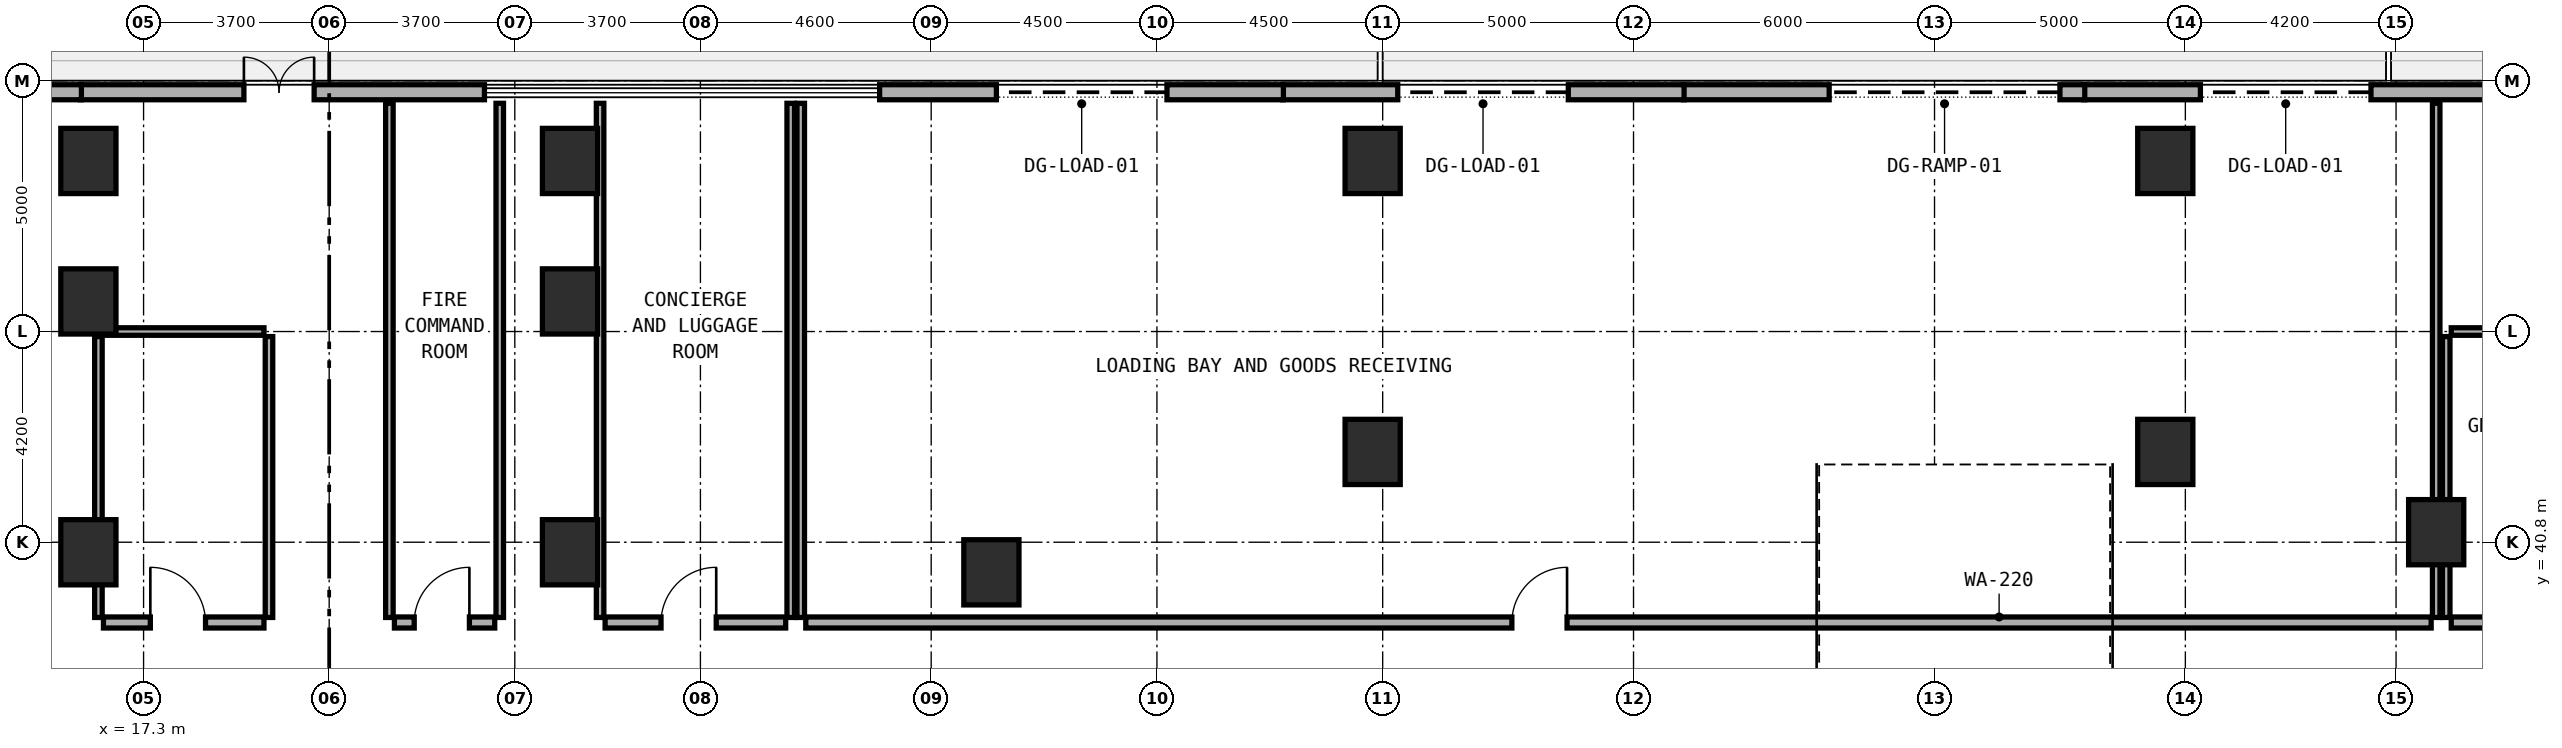
"""IFC4 building model, lengths in metres.
Left out: names, types, materials, properties, quantities, classifications, styles, units other than length and angle.
Written with IfcOpenShell. Run it as: python <this file> out.ifc"""

import sys

from ifc_helpers import new_model, si_unit, direction, frame, frame_2d, origin, origin_2d, place, context, subcontext, project, spatial, rectangle, extrude, element, fill, save


model = new_model("IFC4")
c1 = context("Model", 3, precision=1e-05, world=origin(), true_north=direction((0.0, 1.0)))
c2 = subcontext(c1, "Body", "Model", "MODEL_VIEW")
j1 = project(units=[si_unit("LENGTHUNIT", "METRE"), si_unit("PLANEANGLEUNIT", "RADIAN")], contexts=[c1])
p1 = place(None, origin())
s1 = spatial("IfcSite", under=j1, at=p1, CompositionType="ELEMENT")
p2 = place(p1, origin())
s2 = spatial("IfcBuilding", under=s1, at=p2, CompositionType="ELEMENT")
p3 = place(p2, origin())
s3 = spatial("IfcBuildingStorey", under=s2, at=p3, CompositionType="ELEMENT", Elevation=0.0)
for number, where, z_axis, x_axis in (
    (1, (16.2, 40.6, 0.0), (0.0, 0.0, 1.0), (1.0, 0.0, 0.0)),
    (2, (25.8, 40.6, 0.0), (0.0, 0.0, 1.0), (1.0, 0.0, 0.0)),
    (3, (34.2, 40.2, 0.0), (0.0, 0.0, 1.0), (1.0, 0.0, 0.0)),
    (4, (63.0, 41.0, 0.0), (0.0, 0.0, 1.0), (1.0, 0.0, 0.0)),
    (5, (16.2, 48.4, 0.0), (0.0, 0.0, 1.0), (1.0, 0.0, 0.0)),
    (6, (25.8, 48.4, 0.0), (0.0, 0.0, 1.0), (1.0, 0.0, 0.0)),
    (7, (41.8, 48.4, 0.0), (0.0, 0.0, 1.0), (1.0, 0.0, 0.0)),
    (8, (57.6, 48.4, 0.0), (0.0, 0.0, 1.0), (1.0, 0.0, 0.0)),
    (9, (16.2, 45.6, 0.0), (0.0, 0.0, 1.0), (1.0, 0.0, 0.0)),
    (10, (25.8, 45.6, 0.0), (0.0, 0.0, 1.0), (1.0, 0.0, 0.0)),
    (11, (41.8, 42.6, 0.0), (0.0, 0.0, 1.0), (1.0, 0.0, 0.0)),
    (12, (57.6, 42.6, 0.0), (0.0, 0.0, 1.0), (1.0, 0.0, 0.0)),
):
    element("IfcColumn", number, at=place(p3, frame(where, z_axis=z_axis, x_axis=x_axis)), inside=s3, PredefinedType="COLUMN", context=c2, shape_type="SweptSolid", body=[
        extrude(rectangle(XDim=1.1, YDim=1.3, at=origin_2d()), origin(), (0.0, 0.0, 1.0), 5.4),
    ])
p4 = place(p3, frame((64.028, 49.77, 0.0), z_axis=(0.0, 0.0, 1.0), x_axis=(-1.0, 0.0, 0.0)))
e13 = element("IfcWall", 13, at=p4, inside=s3, PredefinedType="STANDARD", context=c2, shape_type="SweptSolid", body=[
    extrude(rectangle(XDim=8.049, YDim=0.3, at=frame_2d((4.024, 0.0))), origin(), (0.0, 0.0, 1.0), 5.05),
])
p5 = place(p4, frame((2.328, 0.0, 0.0)))
e14 = element("IfcOpeningElement", 14, at=p5, cuts=e13, PredefinedType="OPENING", context=c2, shape_type="SweptSolid", body=[
    extrude(rectangle(XDim=3.4, YDim=3.2, at=frame_2d((1.7, 1.6))), frame((0.0, 0.16, 0.0), z_axis=(0.0, -1.0, 0.0), x_axis=(1.0, 0.0, 0.0)), (0.0, 0.0, 1.0), 0.32),
])
p6 = place(p3, frame((55.995, 49.77, 0.0), z_axis=(0.0, 0.0, 1.0), x_axis=(-1.0, 0.0, 0.0)))
e15 = element("IfcWall", 15, at=p6, inside=s3, PredefinedType="STANDARD", context=c2, shape_type="SweptSolid", body=[
    extrude(rectangle(XDim=8.003, YDim=0.3, at=frame_2d((4.001, 0.0))), origin(), (0.0, 0.0, 1.0), 5.05),
])
p7 = place(p6, frame((0.495, 0.0, 0.0)))
e16 = element("IfcOpeningElement", 16, at=p7, cuts=e15, PredefinedType="OPENING", context=c2, shape_type="SweptSolid", body=[
    extrude(rectangle(XDim=4.6, YDim=3.2, at=frame_2d((2.3, 1.6))), frame((0.0, 0.16, 0.0), z_axis=(0.0, -1.0, 0.0), x_axis=(1.0, 0.0, 0.0)), (0.0, 0.0, 1.0), 0.32),
])
p8 = place(p3, frame((48.008, 49.77, 0.0), z_axis=(0.0, 0.0, 1.0), x_axis=(-1.0, 0.0, 0.0)))
e17 = element("IfcWall", 17, at=p8, inside=s3, PredefinedType="STANDARD", context=c2, shape_type="SweptSolid", body=[
    extrude(rectangle(XDim=8.003, YDim=0.3, at=frame_2d((4.001, 0.0))), origin(), (0.0, 0.0, 1.0), 5.05),
])
p9 = place(p8, frame((2.308, 0.0, 0.0)))
e18 = element("IfcOpeningElement", 18, at=p9, cuts=e17, PredefinedType="OPENING", context=c2, shape_type="SweptSolid", body=[
    extrude(rectangle(XDim=3.4, YDim=3.2, at=frame_2d((1.7, 1.6))), frame((0.0, 0.16, 0.0), z_axis=(0.0, -1.0, 0.0), x_axis=(1.0, 0.0, 0.0)), (0.0, 0.0, 1.0), 0.32),
])
p10 = place(p3, frame((40.021, 49.77, 0.0), z_axis=(0.0, 0.0, 1.0), x_axis=(-1.0, 0.0, 0.0)))
e19 = element("IfcWall", 19, at=p10, inside=s3, PredefinedType="STANDARD", context=c2, shape_type="SweptSolid", body=[
    extrude(rectangle(XDim=8.049, YDim=0.3, at=frame_2d((4.024, 0.0))), origin(), (0.0, 0.0, 1.0), 5.05),
])
p11 = place(p10, frame((2.321, 0.0, 0.0)))
e20 = element("IfcOpeningElement", 20, at=p11, cuts=e19, PredefinedType="OPENING", context=c2, shape_type="SweptSolid", body=[
    extrude(rectangle(XDim=3.4, YDim=3.2, at=frame_2d((1.7, 1.6))), frame((0.0, 0.16, 0.0), z_axis=(0.0, -1.0, 0.0), x_axis=(1.0, 0.0, 0.0)), (0.0, 0.0, 1.0), 0.32),
])
p12 = place(p3, frame((24.095, 49.77, 0.0), z_axis=(0.0, 0.0, 1.0), x_axis=(-1.0, 0.0, 0.0)))
e21 = element("IfcWall", 21, at=p12, inside=s3, PredefinedType="STANDARD", context=c2, shape_type="SweptSolid", body=[
    extrude(rectangle(XDim=8.05, YDim=0.3, at=frame_2d((4.025, 0.0))), origin(), (0.0, 0.0, 1.0), 5.05),
])
p13 = place(p12, frame((3.395, 0.0, 0.0)))
e22 = element("IfcOpeningElement", 22, at=p13, cuts=e21, PredefinedType="OPENING", context=c2, shape_type="SweptSolid", body=[
    extrude(rectangle(XDim=1.4, YDim=2.2, at=frame_2d((0.7, 1.1))), frame((0.0, 0.16, 0.0), z_axis=(0.0, -1.0, 0.0), x_axis=(1.0, 0.0, 0.0)), (0.0, 0.0, 1.0), 0.32),
])
p14 = place(p3, frame((16.061, 49.77, 0.0), z_axis=(0.0, 0.0, 1.0), x_axis=(-1.0, 0.0, 0.0)))
e23 = element("IfcWall", 23, at=p14, inside=s3, PredefinedType="STANDARD", context=c2, shape_type="SweptSolid", body=[
    extrude(rectangle(XDim=8.049, YDim=0.3, at=frame_2d((4.024, 0.0))), origin(), (0.0, 0.0, 1.0), 5.05),
])
p15 = place(p14, frame((2.561, 0.0, 0.0)))
e24 = element("IfcOpeningElement", 24, at=p15, cuts=e23, PredefinedType="OPENING", context=c2, shape_type="SweptSolid", body=[
    extrude(rectangle(XDim=1.4, YDim=2.2, at=frame_2d((0.7, 1.1))), frame((0.0, 0.16, 0.0), z_axis=(0.0, -1.0, 0.0), x_axis=(1.0, 0.0, 0.0)), (0.0, 0.0, 1.0), 0.32),
])
for number, where, z_axis, x_axis in (
    (25, (22.2, 39.3, 0.0), (0.0, 0.0, 1.0), (0.0, 1.0, 0.0)),
    (26, (24.4, 39.3, 0.0), (0.0, 0.0, 1.0), (0.0, 1.0, 0.0)),
):
    element("IfcWall", number, at=place(p3, frame(where, z_axis=z_axis, x_axis=x_axis)), inside=s3, PredefinedType="PARTITIONING", context=c2, shape_type="SweptSolid", body=[
        extrude(rectangle(XDim=10.25, YDim=0.15, at=frame_2d((5.125, 0.0))), origin(), (0.0, 0.0, 1.0), 4.425),
    ])
p16 = place(p3, frame((22.3, 39.2, 0.0), z_axis=(0.0, 0.0, 1.0), x_axis=(1.0, 0.0, 0.0)))
e27 = element("IfcWall", 27, at=p16, inside=s3, PredefinedType="SOLIDWALL", context=c2, shape_type="SweptSolid", body=[
    extrude(rectangle(XDim=2.0, YDim=0.22, at=frame_2d((1.0, 0.0))), origin(), (0.0, 0.0, 1.0), 5.05),
])
p17 = place(p16, frame((0.395, 0.0, 0.0)))
e28 = element("IfcOpeningElement", 28, at=p17, cuts=e27, PredefinedType="OPENING", context=c2, shape_type="SweptSolid", body=[
    extrude(rectangle(XDim=1.1, YDim=2.15, at=frame_2d((0.55, 1.075))), frame((0.0, 0.12, 0.0), z_axis=(0.0, -1.0, 0.0), x_axis=(1.0, 0.0, 0.0)), (0.0, 0.0, 1.0), 0.24),
])
p18 = place(p3, frame((26.4, 39.3, 0.0), z_axis=(0.0, 0.0, 1.0), x_axis=(0.0, 1.0, 0.0)))
e29 = element("IfcWall", 29, at=p18, inside=s3, PredefinedType="PARTITIONING", context=c2, shape_type="SweptSolid", body=[
    extrude(rectangle(XDim=10.25, YDim=0.15, at=frame_2d((5.125, 0.0))), origin(), (0.0, 0.0, 1.0), 4.125),
])
p19 = place(p3, frame((30.2, 39.3, 0.0), z_axis=(0.0, 0.0, 1.0), x_axis=(0.0, 1.0, 0.0)))
e30 = element("IfcWall", 30, at=p19, inside=s3, PredefinedType="PARTITIONING", context=c2, shape_type="SweptSolid", body=[
    extrude(rectangle(XDim=10.25, YDim=0.15, at=frame_2d((5.125, 0.0))), origin(), (0.0, 0.0, 1.0), 4.225),
])
p20 = place(p3, frame((26.5, 39.2, 0.0), z_axis=(0.0, 0.0, 1.0), x_axis=(1.0, 0.0, 0.0)))
e31 = element("IfcWall", 31, at=p20, inside=s3, PredefinedType="SOLIDWALL", context=c2, shape_type="SweptSolid", body=[
    extrude(rectangle(XDim=3.6, YDim=0.22, at=frame_2d((1.8, 0.0))), origin(), (0.0, 0.0, 1.0), 5.05),
])
p21 = place(p20, frame((1.115, 0.0, 0.0)))
e32 = element("IfcOpeningElement", 32, at=p21, cuts=e31, PredefinedType="OPENING", context=c2, shape_type="SweptSolid", body=[
    extrude(rectangle(XDim=1.1, YDim=2.1, at=frame_2d((0.55, 1.05))), frame((0.0, 0.12, 0.0), z_axis=(0.0, -1.0, 0.0), x_axis=(1.0, 0.0, 0.0)), (0.0, 0.0, 1.0), 0.24),
])
p22 = place(p3, frame((16.4, 39.3, 0.0), z_axis=(0.0, 0.0, 1.0), x_axis=(0.0, 1.0, 0.0)))
e33 = element("IfcWall", 33, at=p22, inside=s3, PredefinedType="PARTITIONING", context=c2, shape_type="SweptSolid", body=[
    extrude(rectangle(XDim=5.6, YDim=0.15, at=frame_2d((2.8, 0.0))), origin(), (0.0, 0.0, 1.0), 4.525),
])
p23 = place(p3, frame((19.8, 39.3, 0.0), z_axis=(0.0, 0.0, 1.0), x_axis=(0.0, 1.0, 0.0)))
e34 = element("IfcWall", 34, at=p23, inside=s3, PredefinedType="PARTITIONING", context=c2, shape_type="SweptSolid", body=[
    extrude(rectangle(XDim=5.6, YDim=0.15, at=frame_2d((2.8, 0.0))), origin(), (0.0, 0.0, 1.0), 4.575),
])
p24 = place(p3, frame((16.5, 45.0, 0.0), z_axis=(0.0, 0.0, 1.0), x_axis=(1.0, 0.0, 0.0)))
e35 = element("IfcWall", 35, at=p24, inside=s3, PredefinedType="PARTITIONING", context=c2, shape_type="SweptSolid", body=[
    extrude(rectangle(XDim=3.2, YDim=0.15, at=frame_2d((1.6, 0.0))), origin(), (0.0, 0.0, 1.0), 5.05),
])
p25 = place(p3, frame((16.5, 39.2, 0.0), z_axis=(0.0, 0.0, 1.0), x_axis=(1.0, 0.0, 0.0)))
e36 = element("IfcWall", 36, at=p25, inside=s3, PredefinedType="SOLIDWALL", context=c2, shape_type="SweptSolid", body=[
    extrude(rectangle(XDim=3.2, YDim=0.22, at=frame_2d((1.6, 0.0))), origin(), (0.0, 0.0, 1.0), 5.05),
])
p26 = place(p25, frame((0.935, 0.0, 0.0)))
e37 = element("IfcOpeningElement", 37, at=p26, cuts=e36, PredefinedType="OPENING", context=c2, shape_type="SweptSolid", body=[
    extrude(rectangle(XDim=1.1, YDim=2.1, at=frame_2d((0.55, 1.05))), frame((0.0, 0.12, 0.0), z_axis=(0.0, -1.0, 0.0), x_axis=(1.0, 0.0, 0.0)), (0.0, 0.0, 1.0), 0.24),
])
p27 = place(p3, frame((63.2, 39.3, 0.0), z_axis=(0.0, 0.0, 1.0), x_axis=(0.0, 1.0, 0.0)))
e38 = element("IfcWall", 38, at=p27, inside=s3, PredefinedType="PARTITIONING", context=c2, shape_type="SweptSolid", body=[
    extrude(rectangle(XDim=5.6, YDim=0.15, at=frame_2d((2.8, 0.0))), origin(), (0.0, 0.0, 1.0), 4.665),
])
p28 = place(p3, frame((63.3, 45.0, 0.0), z_axis=(0.0, 0.0, 1.0), x_axis=(1.0, 0.0, 0.0)))
e39 = element("IfcWall", 39, at=p28, inside=s3, PredefinedType="PARTITIONING", context=c2, shape_type="SweptSolid", body=[
    extrude(rectangle(XDim=3.8, YDim=0.15, at=frame_2d((1.9, 0.0))), origin(), (0.0, 0.0, 1.0), 5.05),
])
p29 = place(p3, frame((63.3, 39.2, 0.0), z_axis=(0.0, 0.0, 1.0), x_axis=(1.0, 0.0, 0.0)))
e40 = element("IfcWall", 40, at=p29, inside=s3, PredefinedType="SOLIDWALL", context=c2, shape_type="SweptSolid", body=[
    extrude(rectangle(XDim=3.8, YDim=0.22, at=frame_2d((1.9, 0.0))), origin(), (0.0, 0.0, 1.0), 5.05),
])
p30 = place(p29, frame((1.205, 0.0, 0.0)))
e41 = element("IfcOpeningElement", 41, at=p30, cuts=e40, PredefinedType="OPENING", context=c2, shape_type="SweptSolid", body=[
    extrude(rectangle(XDim=1.1, YDim=2.1, at=frame_2d((0.55, 1.05))), frame((0.0, 0.12, 0.0), z_axis=(0.0, -1.0, 0.0), x_axis=(1.0, 0.0, 0.0)), (0.0, 0.0, 1.0), 0.24),
])
for number, where, z_axis, x_axis in (
    (42, (30.4, 39.3, 0.0), (0.0, 0.0, 1.0), (0.0, 1.0, 0.0)),
    (43, (63.0, 39.3, 0.0), (0.0, 0.0, 1.0), (0.0, 1.0, 0.0)),
):
    element("IfcWall", number, at=place(p3, frame(where, z_axis=z_axis, x_axis=x_axis)), inside=s3, PredefinedType="PARTITIONING", context=c2, shape_type="SweptSolid", body=[
        extrude(rectangle(XDim=10.25, YDim=0.15, at=frame_2d((5.125, 0.0))), origin(), (0.0, 0.0, 1.0), 4.225),
    ])
p31 = place(p3, frame((30.5, 39.2, 0.0), z_axis=(0.0, 0.0, 1.0), x_axis=(1.0, 0.0, 0.0)))
e44 = element("IfcWall", 44, at=p31, inside=s3, PredefinedType="SOLIDWALL", context=c2, shape_type="SweptSolid", body=[
    extrude(rectangle(XDim=32.4, YDim=0.22, at=frame_2d((16.2, 0.0))), origin(), (0.0, 0.0, 1.0), 4.325),
])
p32 = place(p31, frame((14.075, 0.0, 0.0)))
e45 = element("IfcOpeningElement", 45, at=p32, cuts=e44, PredefinedType="OPENING", context=c2, shape_type="SweptSolid", body=[
    extrude(rectangle(XDim=1.1, YDim=2.1, at=frame_2d((0.55, 1.05))), frame((0.0, 0.12, 0.0), z_axis=(0.0, -1.0, 0.0), x_axis=(1.0, 0.0, 0.0)), (0.0, 0.0, 1.0), 0.24),
])
p33 = place(p5, frame((3.4, 0.0, 0.0), z_axis=(0.0, 0.0, 1.0), x_axis=(-1.0, 0.0, 0.0)))
e46 = element("IfcDoor", 46, at=p33, inside=s3, OperationType="ROLLINGUP", PredefinedType="GATE", context=c2, shape_type="SweptSolid", body=[
    extrude(rectangle(XDim=3.4, YDim=3.2, at=frame_2d((1.7, 1.6))), frame((0.0, 0.025, 0.0), z_axis=(0.0, -1.0, 0.0), x_axis=(1.0, 0.0, 0.0)), (0.0, 0.0, 1.0), 0.05),
])
fill(e14, e46)
p34 = place(p7, frame((4.6, 0.0, 0.0), z_axis=(0.0, 0.0, 1.0), x_axis=(-1.0, 0.0, 0.0)))
e47 = element("IfcDoor", 47, at=p34, inside=s3, OperationType="ROLLINGUP", PredefinedType="GATE", context=c2, shape_type="SweptSolid", body=[
    extrude(rectangle(XDim=4.6, YDim=3.2, at=frame_2d((2.3, 1.6))), frame((0.0, 0.025, 0.0), z_axis=(0.0, -1.0, 0.0), x_axis=(1.0, 0.0, 0.0)), (0.0, 0.0, 1.0), 0.05),
])
fill(e16, e47)
p35 = place(p9, frame((3.4, 0.0, 0.0), z_axis=(0.0, 0.0, 1.0), x_axis=(-1.0, 0.0, 0.0)))
e48 = element("IfcDoor", 48, at=p35, inside=s3, OperationType="ROLLINGUP", PredefinedType="GATE", context=c2, shape_type="SweptSolid", body=[
    extrude(rectangle(XDim=3.4, YDim=3.2, at=frame_2d((1.7, 1.6))), frame((0.0, 0.025, 0.0), z_axis=(0.0, -1.0, 0.0), x_axis=(1.0, 0.0, 0.0)), (0.0, 0.0, 1.0), 0.05),
])
fill(e18, e48)
p36 = place(p11, frame((3.4, 0.0, 0.0), z_axis=(0.0, 0.0, 1.0), x_axis=(-1.0, 0.0, 0.0)))
e49 = element("IfcDoor", 49, at=p36, inside=s3, OperationType="ROLLINGUP", PredefinedType="GATE", context=c2, shape_type="SweptSolid", body=[
    extrude(rectangle(XDim=3.4, YDim=3.2, at=frame_2d((1.7, 1.6))), frame((0.0, 0.025, 0.0), z_axis=(0.0, -1.0, 0.0), x_axis=(1.0, 0.0, 0.0)), (0.0, 0.0, 1.0), 0.05),
])
fill(e20, e49)
p37 = place(p13, frame((1.4, 0.0, 0.0), z_axis=(0.0, 0.0, 1.0), x_axis=(-1.0, 0.0, 0.0)))
e50 = element("IfcDoor", 50, at=p37, inside=s3, OperationType="DOUBLE_DOOR_SINGLE_SWING", PredefinedType="DOOR", context=c2, shape_type="SweptSolid", body=[
    extrude(rectangle(XDim=1.4, YDim=2.2, at=frame_2d((0.7, 1.1))), frame((0.0, 0.025, 0.0), z_axis=(0.0, -1.0, 0.0), x_axis=(1.0, 0.0, 0.0)), (0.0, 0.0, 1.0), 0.05),
])
fill(e22, e50)
p38 = place(p17, origin())
e51 = element("IfcDoor", 51, at=p38, inside=s3, OperationType="SINGLE_SWING_RIGHT", PredefinedType="DOOR", context=c2, shape_type="SweptSolid", body=[
    extrude(rectangle(XDim=1.1, YDim=2.15, at=frame_2d((0.55, 1.075))), frame((0.0, 0.025, 0.0), z_axis=(0.0, -1.0, 0.0), x_axis=(1.0, 0.0, 0.0)), (0.0, 0.0, 1.0), 0.05),
])
fill(e28, e51)
p39 = place(p21, origin())
e52 = element("IfcDoor", 52, at=p39, inside=s3, OperationType="SINGLE_SWING_RIGHT", PredefinedType="DOOR", context=c2, shape_type="SweptSolid", body=[
    extrude(rectangle(XDim=1.1, YDim=2.1, at=frame_2d((0.55, 1.05))), frame((0.0, 0.025, 0.0), z_axis=(0.0, -1.0, 0.0), x_axis=(1.0, 0.0, 0.0)), (0.0, 0.0, 1.0), 0.05),
])
fill(e32, e52)
p40 = place(p26, origin())
e53 = element("IfcDoor", 53, at=p40, inside=s3, OperationType="SINGLE_SWING_LEFT", PredefinedType="DOOR", context=c2, shape_type="SweptSolid", body=[
    extrude(rectangle(XDim=1.1, YDim=2.1, at=frame_2d((0.55, 1.05))), frame((0.0, 0.025, 0.0), z_axis=(0.0, -1.0, 0.0), x_axis=(1.0, 0.0, 0.0)), (0.0, 0.0, 1.0), 0.05),
])
fill(e37, e53)
p41 = place(p32, origin())
e54 = element("IfcDoor", 54, at=p41, inside=s3, OperationType="SINGLE_SWING_RIGHT", PredefinedType="DOOR", context=c2, shape_type="SweptSolid", body=[
    extrude(rectangle(XDim=1.1, YDim=2.1, at=frame_2d((0.55, 1.05))), frame((0.0, 0.025, 0.0), z_axis=(0.0, -1.0, 0.0), x_axis=(1.0, 0.0, 0.0)), (0.0, 0.0, 1.0), 0.05),
])
fill(e45, e54)
save(model, sys.argv[1])
